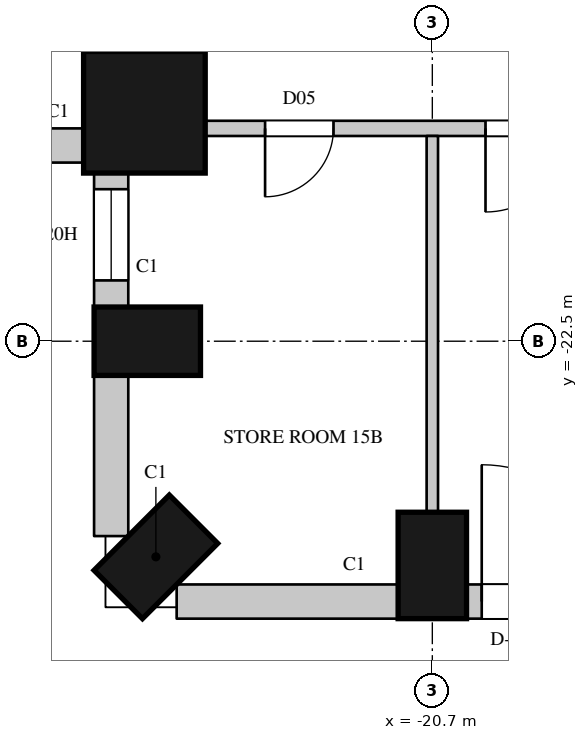
"""IFC4 building model, lengths in metres.
Left out: names, types, materials, properties, quantities, classifications, styles, units other than length and angle.
Written with IfcOpenShell. Run it as: python <this file> out.ifc"""

import sys

from ifc_helpers import new_model, si_unit, direction, frame, frame_2d, origin, origin_2d, place, context, subcontext, project, spatial, rectangle, circle, extrude, element, fill, save


model = new_model("IFC4")
c1 = context("Model", 3, precision=1e-05, world=origin(), true_north=direction((0.0, 1.0)))
c2 = subcontext(c1, "Body", "Model", "MODEL_VIEW")
j1 = project(units=[si_unit("LENGTHUNIT", "METRE"), si_unit("PLANEANGLEUNIT", "RADIAN")], contexts=[c1])
p1 = place(None, origin())
s1 = spatial("IfcSite", under=j1, at=p1, CompositionType="ELEMENT")
p2 = place(p1, origin())
s2 = spatial("IfcBuilding", under=s1, at=p2, CompositionType="ELEMENT")
p3 = place(p2, frame((0.0, 0.0, 84.3)))
s3 = spatial("IfcBuildingStorey", under=s2, at=p3, CompositionType="ELEMENT", Elevation=84.3)
p4 = place(p3, frame((-24.488, -19.488, 0.0), z_axis=(0.0, 0.0, 1.0), x_axis=(1.0, 0.0, 0.0)))
e1 = element("IfcColumn", 1, at=p4, inside=s3, PredefinedType="COLUMN", context=c2, shape_type="SweptSolid", body=[
    extrude(circle(Radius=0.8, at=origin_2d()), origin(), (0.0, 0.0, 1.0), 3.6),
])
for number, where, z_axis, x_axis in (
    (2, (-24.45, -22.5, 0.0), (0.0, 0.0, 1.0), (0.0, -1.0, 0.0)),
    (3, (-24.337, -25.337, 0.0), (0.0, 0.0, 1.0), (0.707, -0.707, 0.0)),
    (4, (-20.7, -25.45, 0.0), (0.0, 0.0, 1.0), (1.0, 0.0, 0.0)),
):
    element("IfcColumn", number, at=place(p3, frame(where, z_axis=z_axis, x_axis=x_axis)), inside=s3, PredefinedType="COLUMN", context=c2, shape_type="SweptSolid", body=[
        extrude(rectangle(XDim=0.9, YDim=1.4, at=origin_2d()), origin(), (0.0, 0.0, 1.0), 3.6),
    ])
p5 = place(p3, frame((-29.064, -19.925, 0.0), z_axis=(0.0, 0.0, 1.0), x_axis=(1.0, 0.0, 0.0)))
e5 = element("IfcWall", 5, at=p5, inside=s3, PredefinedType="SOLIDWALL", context=c2, shape_type="SweptSolid", body=[
    extrude(rectangle(XDim=3.805, YDim=0.45, at=frame_2d((1.903, 0.0))), origin(), (0.0, 0.0, 1.0), 3.3),
])
p6 = place(p5, frame((0.514, 0.0, 1.05)))
e6 = element("IfcOpeningElement", 6, at=p6, cuts=e5, PredefinedType="OPENING", context=c2, shape_type="SweptSolid", body=[
    extrude(rectangle(XDim=2.7, YDim=2.0, at=frame_2d((1.35, 1.0))), frame((0.0, 0.235, 0.0), z_axis=(0.0, -1.0, 0.0), x_axis=(1.0, 0.0, 0.0)), (0.0, 0.0, 1.0), 0.47),
])
p7 = place(p3, frame((-24.925, -20.259, 0.0), z_axis=(0.0, 0.0, 1.0), x_axis=(0.0, -1.0, 0.0)))
e7 = element("IfcWall", 7, at=p7, inside=s3, PredefinedType="SOLIDWALL", context=c2, shape_type="SweptSolid", body=[
    extrude(rectangle(XDim=1.792, YDim=0.45, at=frame_2d((0.896, 0.0))), origin(), (0.0, 0.0, 1.0), 3.3),
])
p8 = place(p7, frame((0.241, 0.0, 1.05)))
e8 = element("IfcOpeningElement", 8, at=p8, cuts=e7, PredefinedType="OPENING", context=c2, shape_type="SweptSolid", body=[
    extrude(rectangle(XDim=1.2, YDim=2.0, at=frame_2d((0.6, 1.0))), frame((0.0, 0.235, 0.0), z_axis=(0.0, -1.0, 0.0), x_axis=(1.0, 0.0, 0.0)), (0.0, 0.0, 1.0), 0.47),
])
p9 = place(p3, frame((-24.925, -22.95, 0.0), z_axis=(0.0, 0.0, 1.0), x_axis=(0.0, -1.0, 0.0)))
e9 = element("IfcWall", 9, at=p9, inside=s3, PredefinedType="SOLIDWALL", context=c2, shape_type="SweptSolid", body=[
    extrude(rectangle(XDim=2.114, YDim=0.45, at=frame_2d((1.057, 0.0))), origin(), (0.0, 0.0, 1.0), 3.3),
])
p10 = place(p3, frame((-24.064, -25.925, 0.0), z_axis=(0.0, 0.0, 1.0), x_axis=(1.0, 0.0, 0.0)))
e10 = element("IfcWall", 10, at=p10, inside=s3, PredefinedType="SOLIDWALL", context=c2, shape_type="SweptSolid", body=[
    extrude(rectangle(XDim=2.914, YDim=0.45, at=frame_2d((1.457, 0.0))), origin(), (0.0, 0.0, 1.0), 3.3),
])
p11 = place(p3, frame((-20.25, -25.925, 0.0), z_axis=(0.0, 0.0, 1.0), x_axis=(1.0, 0.0, 0.0)))
e11 = element("IfcWall", 11, at=p11, inside=s3, PredefinedType="SOLIDWALL", context=c2, shape_type="SweptSolid", body=[
    extrude(rectangle(XDim=8.1, YDim=0.45, at=frame_2d((4.05, 0.0))), origin(), (0.0, 0.0, 1.0), 3.3),
])
p12 = place(p11, frame((0.2, 0.0, 0.0)))
e12 = element("IfcOpeningElement", 12, at=p12, cuts=e11, PredefinedType="OPENING", context=c2, shape_type="SweptSolid", body=[
    extrude(rectangle(XDim=1.8, YDim=2.4, at=frame_2d((0.9, 1.2))), frame((0.0, 0.235, 0.0), z_axis=(0.0, -1.0, 0.0), x_axis=(1.0, 0.0, 0.0)), (0.0, 0.0, 1.0), 0.47),
])
p13 = place(p11, frame((2.2, 0.0, 1.05)))
e13 = element("IfcOpeningElement", 13, at=p13, cuts=e11, PredefinedType="OPENING", context=c2, shape_type="SweptSolid", body=[
    extrude(rectangle(XDim=1.2, YDim=2.0, at=frame_2d((0.6, 1.0))), frame((0.0, 0.235, 0.0), z_axis=(0.0, -1.0, 0.0), x_axis=(1.0, 0.0, 0.0)), (0.0, 0.0, 1.0), 0.47),
])
p14 = place(p11, frame((4.7, 0.0, 0.0)))
e14 = element("IfcOpeningElement", 14, at=p14, cuts=e11, PredefinedType="OPENING", context=c2, shape_type="SweptSolid", body=[
    extrude(rectangle(XDim=1.8, YDim=2.4, at=frame_2d((0.9, 1.2))), frame((0.0, 0.235, 0.0), z_axis=(0.0, -1.0, 0.0), x_axis=(1.0, 0.0, 0.0)), (0.0, 0.0, 1.0), 0.47),
])
p15 = place(p11, frame((6.7, 0.0, 1.05)))
e15 = element("IfcOpeningElement", 15, at=p15, cuts=e11, PredefinedType="OPENING", context=c2, shape_type="SweptSolid", body=[
    extrude(rectangle(XDim=1.2, YDim=2.0, at=frame_2d((0.6, 1.0))), frame((0.0, 0.235, 0.0), z_axis=(0.0, -1.0, 0.0), x_axis=(1.0, 0.0, 0.0)), (0.0, 0.0, 1.0), 0.47),
])
p16 = place(p3, frame((-24.7, -18.7, 0.0), z_axis=(0.0, 0.0, 1.0), x_axis=(0.0, 1.0, 0.0)))
e16 = element("IfcWall", 16, at=p16, inside=s3, PredefinedType="PARTITIONING", context=c2, shape_type="SweptSolid", body=[
    extrude(rectangle(XDim=2.67, YDim=0.2, at=frame_2d((1.335, 0.0))), origin(), (0.0, 0.0, 1.0), 3.3),
])
p17 = place(p16, frame((0.6, 0.0, 0.0)))
e17 = element("IfcOpeningElement", 17, at=p17, cuts=e16, PredefinedType="OPENING", context=c2, shape_type="SweptSolid", body=[
    extrude(rectangle(XDim=1.6, YDim=2.4, at=frame_2d((0.8, 1.2))), frame((0.0, 0.11, 0.0), z_axis=(0.0, -1.0, 0.0), x_axis=(1.0, 0.0, 0.0)), (0.0, 0.0, 1.0), 0.22),
])
p18 = place(p3, frame((-23.7, -19.7, 0.0), z_axis=(0.0, 0.0, 1.0), x_axis=(1.0, 0.0, 0.0)))
e18 = element("IfcWall", 18, at=p18, inside=s3, PredefinedType="PARTITIONING", context=c2, shape_type="SweptSolid", body=[
    extrude(rectangle(XDim=5.1, YDim=0.2, at=frame_2d((2.55, 0.0))), origin(), (0.0, 0.0, 1.0), 3.3),
])
p19 = place(p18, frame((0.8, 0.0, 0.0)))
e19 = element("IfcOpeningElement", 19, at=p19, cuts=e18, PredefinedType="OPENING", context=c2, shape_type="SweptSolid", body=[
    extrude(rectangle(XDim=0.9, YDim=2.2, at=frame_2d((0.45, 1.1))), frame((0.0, 0.11, 0.0), z_axis=(0.0, -1.0, 0.0), x_axis=(1.0, 0.0, 0.0)), (0.0, 0.0, 1.0), 0.22),
])
p20 = place(p18, frame((3.7, 0.0, 0.0)))
e20 = element("IfcOpeningElement", 20, at=p20, cuts=e18, PredefinedType="OPENING", context=c2, shape_type="SweptSolid", body=[
    extrude(rectangle(XDim=1.1, YDim=2.4, at=frame_2d((0.55, 1.2))), frame((0.0, 0.11, 0.0), z_axis=(0.0, -1.0, 0.0), x_axis=(1.0, 0.0, 0.0)), (0.0, 0.0, 1.0), 0.22),
])
p21 = place(p3, frame((-20.7, -24.75, 0.0), z_axis=(0.0, 0.0, 1.0), x_axis=(0.0, 1.0, 0.0)))
e21 = element("IfcWall", 21, at=p21, inside=s3, PredefinedType="PARTITIONING", context=c2, shape_type="SweptSolid", body=[
    extrude(rectangle(XDim=4.95, YDim=0.15, at=frame_2d((2.475, 0.0))), origin(), (0.0, 0.0, 1.0), 2.75),
])
p22 = place(p8, origin())
e22 = element("IfcWindow", 22, at=p22, inside=s3, PartitioningType="SINGLE_PANEL", PredefinedType="WINDOW", context=c2, shape_type="SweptSolid", body=[
    extrude(rectangle(XDim=1.2, YDim=2.0, at=frame_2d((0.6, 1.0))), frame((0.0, 0.135, 0.0), z_axis=(0.0, -1.0, 0.0), x_axis=(1.0, 0.0, 0.0)), (0.0, 0.0, 1.0), 0.06),
])
fill(e8, e22)
p23 = place(p12, origin())
e23 = element("IfcDoor", 23, at=p23, inside=s3, OperationType="SLIDING_TO_LEFT", PredefinedType="DOOR", context=c2, shape_type="SweptSolid", body=[
    extrude(rectangle(XDim=1.8, YDim=2.4, at=frame_2d((0.9, 1.2))), frame((0.0, 0.13, 0.0), z_axis=(0.0, -1.0, 0.0), x_axis=(1.0, 0.0, 0.0)), (0.0, 0.0, 1.0), 0.05),
])
fill(e12, e23)
p24 = place(p19, origin())
e24 = element("IfcDoor", 24, at=p24, inside=s3, OperationType="SINGLE_SWING_RIGHT", PredefinedType="DOOR", context=c2, shape_type="SweptSolid", body=[
    extrude(rectangle(XDim=0.9, YDim=2.2, at=frame_2d((0.45, 1.1))), frame((0.0, 0.025, 0.0), z_axis=(0.0, -1.0, 0.0), x_axis=(1.0, 0.0, 0.0)), (0.0, 0.0, 1.0), 0.05),
])
fill(e19, e24)
p25 = place(p20, origin())
e25 = element("IfcDoor", 25, at=p25, inside=s3, OperationType="SINGLE_SWING_RIGHT", PredefinedType="DOOR", context=c2, shape_type="SweptSolid", body=[
    extrude(rectangle(XDim=1.1, YDim=2.4, at=frame_2d((0.55, 1.2))), frame((0.0, 0.025, 0.0), z_axis=(0.0, -1.0, 0.0), x_axis=(1.0, 0.0, 0.0)), (0.0, 0.0, 1.0), 0.05),
])
fill(e20, e25)
save(model, sys.argv[1])
